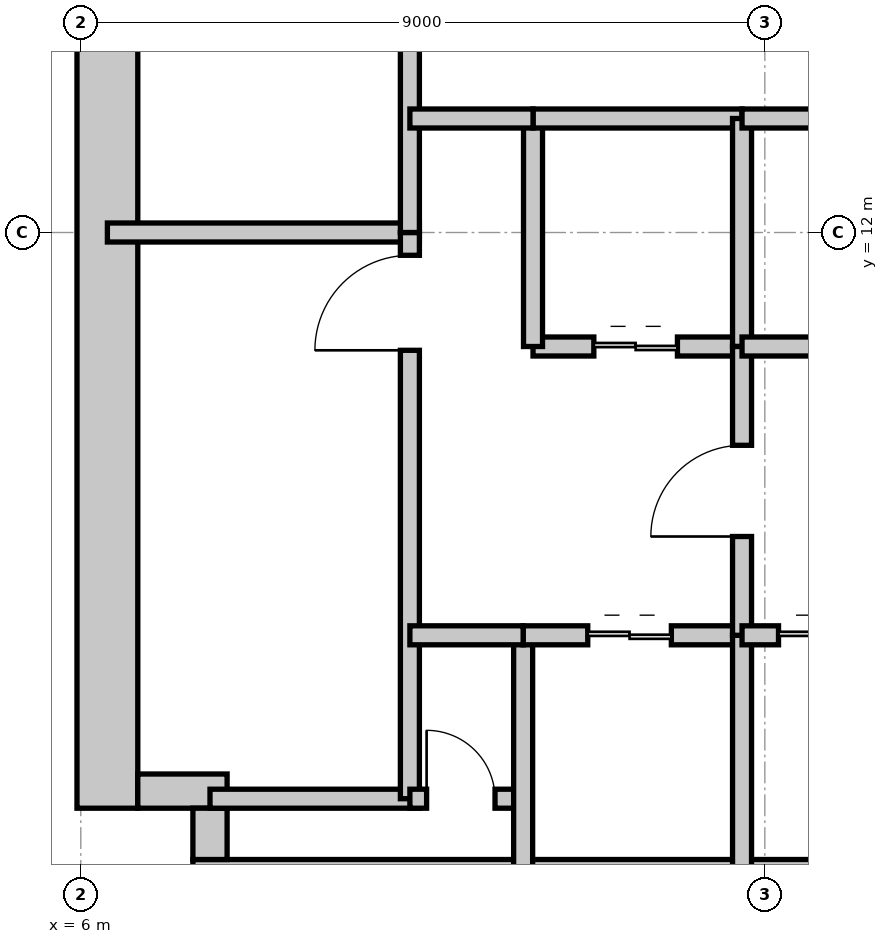
"""IFC4 building model, lengths in metres.
Left out: names, types, materials, properties, quantities, classifications, styles, units other than length and angle.
Written with IfcOpenShell. Run it as: python <this file> out.ifc"""

import sys

from ifc_helpers import new_model, si_unit, direction, frame, frame_2d, origin, place, context, subcontext, project, spatial, rectangle, extrude, element, fill, save


model = new_model("IFC4")
c1 = context("Model", 3, precision=1e-05, world=origin(), true_north=direction((0.0, 1.0)))
c2 = subcontext(c1, "Body", "Model", "MODEL_VIEW")
j1 = project(units=[si_unit("LENGTHUNIT", "METRE"), si_unit("PLANEANGLEUNIT", "RADIAN")], contexts=[c1])
p1 = place(None, origin())
s1 = spatial("IfcSite", under=j1, at=p1, CompositionType="ELEMENT")
p2 = place(p1, origin())
s2 = spatial("IfcBuilding", under=s1, at=p2, CompositionType="ELEMENT")
p3 = place(p2, frame((0.0, 0.0, 38.4)))
s3 = spatial("IfcBuildingStorey", under=s2, at=p3, CompositionType="ELEMENT", Elevation=38.4)
p4 = place(p3, frame((7.475, 3.35, 0.0), z_axis=(0.0, 0.0, 1.0), x_axis=(1.0, 0.0, 0.0)))
e1 = element("IfcWall", 1, at=p4, inside=s3, PredefinedType="SHEAR", context=c2, shape_type="SweptSolid", body=[
    extrude(rectangle(XDim=16.575, YDim=0.8, at=frame_2d((8.288, 0.0))), origin(), (0.0, 0.0, 1.0), 4.2),
])
p5 = place(p3, frame((6.35, 4.425, 0.0), z_axis=(0.0, 0.0, 1.0), x_axis=(0.0, 1.0, 0.0)))
e2 = element("IfcWall", 2, at=p5, inside=s3, PredefinedType="SHEAR", context=c2, shape_type="SweptSolid", body=[
    extrude(rectangle(XDim=15.15, YDim=0.8, at=frame_2d((7.575, 0.0))), origin(), (0.0, 0.0, 1.0), 4.2),
])
p6 = place(p3, frame((6.75, 4.65, 0.0), z_axis=(0.0, 0.0, 1.0), x_axis=(1.0, 0.0, 0.0)))
e3 = element("IfcWall", 3, at=p6, inside=s3, PredefinedType="SHEAR", context=c2, shape_type="SweptSolid", body=[
    extrude(rectangle(XDim=1.175, YDim=0.45, at=frame_2d((0.587, 0.0))), origin(), (0.0, 0.0, 1.0), 4.2),
])
p7 = place(p3, frame((7.7, 3.75, 0.0), z_axis=(0.0, 0.0, 1.0), x_axis=(0.0, 1.0, 0.0)))
e4 = element("IfcWall", 4, at=p7, inside=s3, PredefinedType="SHEAR", context=c2, shape_type="SweptSolid", body=[
    extrude(rectangle(XDim=0.675, YDim=0.45, at=frame_2d((0.337, 0.0))), origin(), (0.0, 0.0, 1.0), 4.2),
])
p8 = place(p3, frame((6.35, 12.0, 0.0), z_axis=(0.0, 0.0, 1.0), x_axis=(1.0, 0.0, 0.0)))
e5 = element("IfcWall", 5, at=p8, inside=s3, PredefinedType="SHEAR", context=c2, shape_type="SweptSolid", body=[
    extrude(rectangle(XDim=4.105, YDim=0.25, at=frame_2d((2.052, 0.0))), origin(), (0.0, 0.0, 1.0), 4.2),
])
p9 = place(p3, frame((7.7, 4.55, 0.0), z_axis=(0.0, 0.0, 1.0), x_axis=(1.0, 0.0, 0.0)))
e6 = element("IfcWall", 6, at=p9, inside=s3, PredefinedType="SHEAR", context=c2, shape_type="SweptSolid", body=[
    extrude(rectangle(XDim=2.755, YDim=0.25, at=frame_2d((1.377, 0.0))), origin(), (0.0, 0.0, 1.0), 4.2),
])
p10 = place(p3, frame((10.33, 4.55, 0.0), z_axis=(0.0, 0.0, 1.0), x_axis=(0.0, 1.0, 0.0)))
e7 = element("IfcWall", 7, at=p10, inside=s3, PredefinedType="SHEAR", context=c2, shape_type="SweptSolid", body=[
    extrude(rectangle(XDim=7.45, YDim=0.25, at=frame_2d((3.725, 0.0))), origin(), (0.0, 0.0, 1.0), 4.2),
])
p11 = place(p10, frame((5.9, 0.0, 0.0)))
e8 = element("IfcOpeningElement", 8, at=p11, cuts=e7, PredefinedType="OPENING", context=c2, shape_type="SweptSolid", body=[
    extrude(rectangle(XDim=1.25, YDim=2.2, at=frame_2d((0.625, 1.1))), frame((0.0, 0.135, 0.0), z_axis=(0.0, -1.0, 0.0), x_axis=(1.0, 0.0, 0.0)), (0.0, 0.0, 1.0), 0.27),
])
p12 = place(p3, frame((10.33, 12.0, 0.0), z_axis=(0.0, 0.0, 1.0), x_axis=(0.0, 1.0, 0.0)))
e9 = element("IfcWall", 9, at=p12, inside=s3, PredefinedType="SHEAR", context=c2, shape_type="SweptSolid", body=[
    extrude(rectangle(XDim=7.45, YDim=0.25, at=frame_2d((3.725, 0.0))), origin(), (0.0, 0.0, 1.0), 4.2),
])
p13 = place(p12, frame((5.85, 0.0, 0.0)))
e10 = element("IfcOpeningElement", 10, at=p13, cuts=e9, PredefinedType="OPENING", context=c2, shape_type="SweptSolid", body=[
    extrude(rectangle(XDim=1.25, YDim=2.2, at=frame_2d((0.625, 1.1))), frame((0.0, 0.135, 0.0), z_axis=(0.0, -1.0, 0.0), x_axis=(1.0, 0.0, 0.0)), (0.0, 0.0, 1.0), 0.27),
])
p14 = place(p3, frame((10.33, 4.55, 0.0), z_axis=(0.0, 0.0, 1.0), x_axis=(1.0, 0.0, 0.0)))
e11 = element("IfcWall", 11, at=p14, inside=s3, PredefinedType="PARTITIONING", context=c2, shape_type="SweptSolid", body=[
    extrude(rectangle(XDim=1.49, YDim=0.25, at=frame_2d((0.745, 0.0))), origin(), (0.0, 0.0, 1.0), 3.97),
])
p15 = place(p14, frame((0.22, 0.0, 0.0)))
e12 = element("IfcOpeningElement", 12, at=p15, cuts=e11, PredefinedType="OPENING", context=c2, shape_type="SweptSolid", body=[
    extrude(rectangle(XDim=0.9, YDim=2.1, at=frame_2d((0.45, 1.05))), frame((0.0, 0.135, 0.0), z_axis=(0.0, -1.0, 0.0), x_axis=(1.0, 0.0, 0.0)), (0.0, 0.0, 1.0), 0.27),
])
p16 = place(p3, frame((11.82, 3.35, 0.0), z_axis=(0.0, 0.0, 1.0), x_axis=(0.0, 1.0, 0.0)))
e13 = element("IfcWall", 13, at=p16, inside=s3, PredefinedType="PARTITIONING", context=c2, shape_type="SweptSolid", body=[
    extrude(rectangle(XDim=3.35, YDim=0.25, at=frame_2d((1.675, 0.0))), origin(), (0.0, 0.0, 1.0), 3.97),
])
p17 = place(p3, frame((11.82, 6.7, 0.0), z_axis=(0.0, 0.0, 1.0), x_axis=(1.0, 0.0, 0.0)))
e14 = element("IfcWall", 14, at=p17, inside=s3, PredefinedType="PARTITIONING", context=c2, shape_type="SweptSolid", body=[
    extrude(rectangle(XDim=2.88, YDim=0.25, at=frame_2d((1.44, 0.0))), origin(), (0.0, 0.0, 1.0), 3.426),
])
p18 = place(p17, frame((0.85, 0.0, 0.0)))
e15 = element("IfcOpeningElement", 15, at=p18, cuts=e14, PredefinedType="OPENING", context=c2, shape_type="SweptSolid", body=[
    extrude(rectangle(XDim=1.1, YDim=2.25, at=frame_2d((0.55, 1.125))), frame((0.0, 0.135, 0.0), z_axis=(0.0, -1.0, 0.0), x_axis=(1.0, 0.0, 0.0)), (0.0, 0.0, 1.0), 0.27),
])
p19 = place(p3, frame((14.7, 3.35, 0.0), z_axis=(0.0, 0.0, 1.0), x_axis=(0.0, 1.0, 0.0)))
e16 = element("IfcWall", 16, at=p19, inside=s3, PredefinedType="PARTITIONING", context=c2, shape_type="SweptSolid", body=[
    extrude(rectangle(XDim=3.35, YDim=0.25, at=frame_2d((1.675, 0.0))), origin(), (0.0, 0.0, 1.0), 3.97),
])
p20 = place(p3, frame((11.95, 10.5, 0.0), z_axis=(0.0, 0.0, 1.0), x_axis=(1.0, 0.0, 0.0)))
e17 = element("IfcWall", 17, at=p20, inside=s3, PredefinedType="PARTITIONING", context=c2, shape_type="SweptSolid", body=[
    extrude(rectangle(XDim=2.75, YDim=0.25, at=frame_2d((1.375, 0.0))), origin(), (0.0, 0.0, 1.0), 3.426),
])
p21 = place(p20, frame((0.8, 0.0, 0.0)))
e18 = element("IfcOpeningElement", 18, at=p21, cuts=e17, PredefinedType="OPENING", context=c2, shape_type="SweptSolid", body=[
    extrude(rectangle(XDim=1.1, YDim=2.25, at=frame_2d((0.55, 1.125))), frame((0.0, 0.135, 0.0), z_axis=(0.0, -1.0, 0.0), x_axis=(1.0, 0.0, 0.0)), (0.0, 0.0, 1.0), 0.27),
])
p22 = place(p3, frame((11.95, 10.5, 0.0), z_axis=(0.0, 0.0, 1.0), x_axis=(0.0, 1.0, 0.0)))
e19 = element("IfcWall", 19, at=p22, inside=s3, PredefinedType="PARTITIONING", context=c2, shape_type="SweptSolid", body=[
    extrude(rectangle(XDim=3.0, YDim=0.25, at=frame_2d((1.5, 0.0))), origin(), (0.0, 0.0, 1.0), 3.97),
])
p23 = place(p3, frame((11.95, 13.5, 0.0), z_axis=(0.0, 0.0, 1.0), x_axis=(1.0, 0.0, 0.0)))
e20 = element("IfcWall", 20, at=p23, inside=s3, PredefinedType="PARTITIONING", context=c2, shape_type="SweptSolid", body=[
    extrude(rectangle(XDim=2.75, YDim=0.25, at=frame_2d((1.375, 0.0))), origin(), (0.0, 0.0, 1.0), 3.426),
])
p24 = place(p3, frame((14.7, 10.5, 0.0), z_axis=(0.0, 0.0, 1.0), x_axis=(0.0, 1.0, 0.0)))
e21 = element("IfcWall", 21, at=p24, inside=s3, PredefinedType="PARTITIONING", context=c2, shape_type="SweptSolid", body=[
    extrude(rectangle(XDim=3.0, YDim=0.25, at=frame_2d((1.5, 0.0))), origin(), (0.0, 0.0, 1.0), 3.97),
])
p25 = place(p3, frame((14.7, 6.7, 0.0), z_axis=(0.0, 0.0, 1.0), x_axis=(0.0, 1.0, 0.0)))
e22 = element("IfcWall", 22, at=p25, inside=s3, PredefinedType="PARTITIONING", context=c2, shape_type="SweptSolid", body=[
    extrude(rectangle(XDim=3.8, YDim=0.25, at=frame_2d((1.9, 0.0))), origin(), (0.0, 0.0, 1.0), 3.97),
])
p26 = place(p25, frame((1.3, 0.0, 0.0)))
e23 = element("IfcOpeningElement", 23, at=p26, cuts=e22, PredefinedType="OPENING", context=c2, shape_type="SweptSolid", body=[
    extrude(rectangle(XDim=1.2, YDim=2.2, at=frame_2d((0.6, 1.1))), frame((0.0, 0.135, 0.0), z_axis=(0.0, -1.0, 0.0), x_axis=(1.0, 0.0, 0.0)), (0.0, 0.0, 1.0), 0.27),
])
p27 = place(p3, frame((10.33, 13.5, 0.0), z_axis=(0.0, 0.0, 1.0), x_axis=(1.0, 0.0, 0.0)))
e24 = element("IfcWall", 24, at=p27, inside=s3, PredefinedType="PARTITIONING", context=c2, shape_type="SweptSolid", body=[
    extrude(rectangle(XDim=1.62, YDim=0.25, at=frame_2d((0.81, 0.0))), origin(), (0.0, 0.0, 1.0), 3.426),
])
p28 = place(p3, frame((10.33, 6.7, 0.0), z_axis=(0.0, 0.0, 1.0), x_axis=(1.0, 0.0, 0.0)))
e25 = element("IfcWall", 25, at=p28, inside=s3, PredefinedType="PARTITIONING", context=c2, shape_type="SweptSolid", body=[
    extrude(rectangle(XDim=1.49, YDim=0.25, at=frame_2d((0.745, 0.0))), origin(), (0.0, 0.0, 1.0), 3.426),
])
p29 = place(p3, frame((14.7, 6.7, 0.0), z_axis=(0.0, 0.0, 1.0), x_axis=(1.0, 0.0, 0.0)))
e26 = element("IfcWall", 26, at=p29, inside=s3, PredefinedType="PARTITIONING", context=c2, shape_type="SweptSolid", body=[
    extrude(rectangle(XDim=2.15, YDim=0.25, at=frame_2d((1.075, 0.0))), origin(), (0.0, 0.0, 1.0), 3.426),
])
p30 = place(p29, frame((0.48, 0.0, 0.0)))
e27 = element("IfcOpeningElement", 27, at=p30, cuts=e26, PredefinedType="OPENING", context=c2, shape_type="SweptSolid", body=[
    extrude(rectangle(XDim=1.15, YDim=2.25, at=frame_2d((0.575, 1.125))), frame((0.0, 0.135, 0.0), z_axis=(0.0, -1.0, 0.0), x_axis=(1.0, 0.0, 0.0)), (0.0, 0.0, 1.0), 0.27),
])
p31 = place(p3, frame((14.7, 10.5, 0.0), z_axis=(0.0, 0.0, 1.0), x_axis=(1.0, 0.0, 0.0)))
e28 = element("IfcWall", 28, at=p31, inside=s3, PredefinedType="PARTITIONING", context=c2, shape_type="SweptSolid", body=[
    extrude(rectangle(XDim=2.15, YDim=0.25, at=frame_2d((1.075, 0.0))), origin(), (0.0, 0.0, 1.0), 3.426),
])
p32 = place(p3, frame((14.7, 13.5, 0.0), z_axis=(0.0, 0.0, 1.0), x_axis=(1.0, 0.0, 0.0)))
e29 = element("IfcWall", 29, at=p32, inside=s3, PredefinedType="PARTITIONING", context=c2, shape_type="SweptSolid", body=[
    extrude(rectangle(XDim=8.95, YDim=0.25, at=frame_2d((4.475, 0.0))), origin(), (0.0, 0.0, 1.0), 3.426),
])
p33 = place(p11, origin())
e30 = element("IfcDoor", 30, at=p33, inside=s3, OperationType="SINGLE_SWING_LEFT", PredefinedType="DOOR", context=c2, shape_type="SweptSolid", body=[
    extrude(rectangle(XDim=1.25, YDim=2.2, at=frame_2d((0.625, 1.1))), frame((0.0, 0.025, 0.0), z_axis=(0.0, -1.0, 0.0), x_axis=(1.0, 0.0, 0.0)), (0.0, 0.0, 1.0), 0.05),
])
fill(e8, e30)
p34 = place(p15, origin())
e31 = element("IfcDoor", 31, at=p34, inside=s3, OperationType="SINGLE_SWING_LEFT", PredefinedType="TRAPDOOR", context=c2, shape_type="SweptSolid", body=[
    extrude(rectangle(XDim=0.9, YDim=2.1, at=frame_2d((0.45, 1.05))), frame((0.0, 0.025, 0.0), z_axis=(0.0, -1.0, 0.0), x_axis=(1.0, 0.0, 0.0)), (0.0, 0.0, 1.0), 0.05),
])
fill(e12, e31)
p35 = place(p18, origin())
e32 = element("IfcDoor", 32, at=p35, inside=s3, OperationType="DOUBLE_DOOR_SLIDING", PredefinedType="DOOR", context=c2, shape_type="SweptSolid", body=[
    extrude(rectangle(XDim=1.1, YDim=2.25, at=frame_2d((0.55, 1.125))), frame((0.0, 0.025, 0.0), z_axis=(0.0, -1.0, 0.0), x_axis=(1.0, 0.0, 0.0)), (0.0, 0.0, 1.0), 0.05),
])
fill(e15, e32)
p36 = place(p21, origin())
e33 = element("IfcDoor", 33, at=p36, inside=s3, OperationType="DOUBLE_DOOR_SLIDING", PredefinedType="DOOR", context=c2, shape_type="SweptSolid", body=[
    extrude(rectangle(XDim=1.1, YDim=2.25, at=frame_2d((0.55, 1.125))), frame((0.0, 0.025, 0.0), z_axis=(0.0, -1.0, 0.0), x_axis=(1.0, 0.0, 0.0)), (0.0, 0.0, 1.0), 0.05),
])
fill(e18, e33)
p37 = place(p26, origin())
e34 = element("IfcDoor", 34, at=p37, inside=s3, OperationType="SINGLE_SWING_LEFT", PredefinedType="DOOR", context=c2, shape_type="SweptSolid", body=[
    extrude(rectangle(XDim=1.2, YDim=2.2, at=frame_2d((0.6, 1.1))), frame((0.0, 0.025, 0.0), z_axis=(0.0, -1.0, 0.0), x_axis=(1.0, 0.0, 0.0)), (0.0, 0.0, 1.0), 0.05),
])
fill(e23, e34)
p38 = place(p30, origin())
e35 = element("IfcDoor", 35, at=p38, inside=s3, OperationType="DOUBLE_DOOR_SLIDING", PredefinedType="DOOR", context=c2, shape_type="SweptSolid", body=[
    extrude(rectangle(XDim=1.15, YDim=2.25, at=frame_2d((0.575, 1.125))), frame((0.0, 0.025, 0.0), z_axis=(0.0, -1.0, 0.0), x_axis=(1.0, 0.0, 0.0)), (0.0, 0.0, 1.0), 0.05),
])
fill(e27, e35)
save(model, sys.argv[1])
